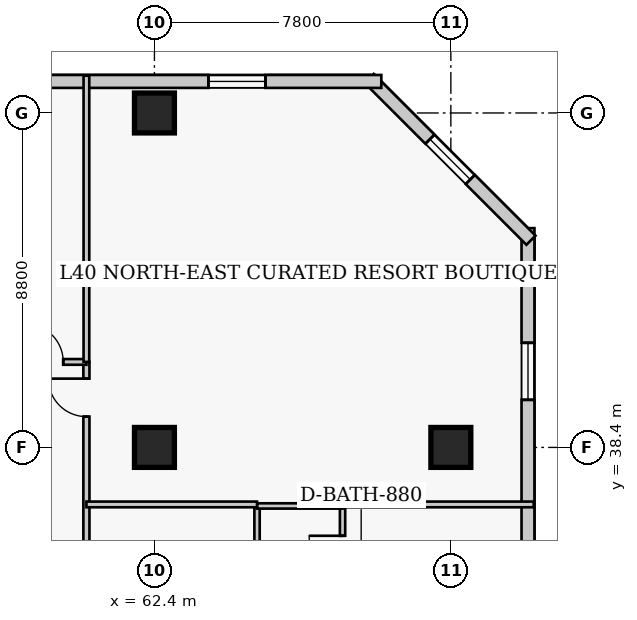
"""IFC4 building model, lengths in metres.
Left out: names, types, materials, properties, quantities, classifications, styles, units other than length and angle.
Written with IfcOpenShell. Run it as: python <this file> out.ifc"""

import sys

from ifc_helpers import new_model, si_unit, direction, frame, frame_2d, origin, origin_2d, place, context, subcontext, project, spatial, rectangle, extrude, element, fill, save


model = new_model("IFC4")
c1 = context("Model", 3, precision=1e-05, world=origin(), true_north=direction((0.0, 1.0)))
c2 = subcontext(c1, "Body", "Model", "MODEL_VIEW")
j1 = project(units=[si_unit("LENGTHUNIT", "METRE"), si_unit("PLANEANGLEUNIT", "RADIAN")], contexts=[c1])
p1 = place(None, origin())
s1 = spatial("IfcSite", under=j1, at=p1, CompositionType="ELEMENT")
p2 = place(p1, origin())
s2 = spatial("IfcBuilding", under=s1, at=p2, CompositionType="ELEMENT")
p3 = place(p2, frame((0.0, 0.0, 161.2)))
s3 = spatial("IfcBuildingStorey", under=s2, at=p3, CompositionType="ELEMENT", Elevation=161.2)
for number, where, z_axis, x_axis in (
    (1, (62.4, 38.4, 0.0), (0.0, 0.0, 1.0), (1.0, 0.0, 0.0)),
    (2, (62.4, 47.2, 0.0), (0.0, 0.0, 1.0), (1.0, 0.0, 0.0)),
    (3, (70.2, 38.4, 0.0), (0.0, 0.0, 1.0), (1.0, 0.0, 0.0)),
):
    element("IfcColumn", number, at=place(p3, frame(where, z_axis=z_axis, x_axis=x_axis)), inside=s3, PredefinedType="COLUMN", context=c2, shape_type="SweptSolid", body=[
        extrude(rectangle(XDim=1.05, YDim=1.05, at=origin_2d()), origin(), (0.0, 0.0, 1.0), 3.8),
    ])
p4 = place(p3, frame((72.23, 14.03, 0.0), z_axis=(0.0, 0.0, 1.0), x_axis=(0.0, 1.0, 0.0)))
e4 = element("IfcWall", 4, at=p4, inside=s3, PredefinedType="SOLIDWALL", context=c2, shape_type="SweptSolid", body=[
    extrude(rectangle(XDim=30.14, YDim=0.34, at=frame_2d((15.07, 0.0))), origin(), (0.0, 0.0, 1.0), 3.55),
])
p5 = place(p4, frame((3.018, 0.0, 0.85)))
e5 = element("IfcOpeningElement", 5, at=p5, cuts=e4, PredefinedType="OPENING", context=c2, shape_type="SweptSolid", body=[
    extrude(rectangle(XDim=1.5, YDim=1.75, at=frame_2d((0.75, 0.875))), frame((0.0, 0.18, 0.0), z_axis=(0.0, -1.0, 0.0), x_axis=(1.0, 0.0, 0.0)), (0.0, 0.0, 1.0), 0.36),
])
p6 = place(p4, frame((10.552, 0.0, 0.85)))
e6 = element("IfcOpeningElement", 6, at=p6, cuts=e4, PredefinedType="OPENING", context=c2, shape_type="SweptSolid", body=[
    extrude(rectangle(XDim=1.5, YDim=1.75, at=frame_2d((0.75, 0.875))), frame((0.0, 0.18, 0.0), z_axis=(0.0, -1.0, 0.0), x_axis=(1.0, 0.0, 0.0)), (0.0, 0.0, 1.0), 0.36),
])
p7 = place(p4, frame((18.087, 0.0, 0.85)))
e7 = element("IfcOpeningElement", 7, at=p7, cuts=e4, PredefinedType="OPENING", context=c2, shape_type="SweptSolid", body=[
    extrude(rectangle(XDim=1.5, YDim=1.75, at=frame_2d((0.75, 0.875))), frame((0.0, 0.18, 0.0), z_axis=(0.0, -1.0, 0.0), x_axis=(1.0, 0.0, 0.0)), (0.0, 0.0, 1.0), 0.36),
])
p8 = place(p4, frame((25.623, 0.0, 0.85)))
e8 = element("IfcOpeningElement", 8, at=p8, cuts=e4, PredefinedType="OPENING", context=c2, shape_type="SweptSolid", body=[
    extrude(rectangle(XDim=1.5, YDim=1.75, at=frame_2d((0.75, 0.875))), frame((0.0, 0.18, 0.0), z_axis=(0.0, -1.0, 0.0), x_axis=(1.0, 0.0, 0.0)), (0.0, 0.0, 1.0), 0.36),
])
p9 = place(p3, frame((72.308, 43.852, 0.0), z_axis=(0.0, 0.0, 1.0), x_axis=(-0.707106781187, 0.707106781187, 0.0)))
e9 = element("IfcWall", 9, at=p9, inside=s3, PredefinedType="SOLIDWALL", context=c2, shape_type="SweptSolid", body=[
    extrude(rectangle(XDim=6.02, YDim=0.34, at=frame_2d((3.01, 0.0))), origin(), (0.0, 0.0, 1.0), 3.55),
])
p10 = place(p9, frame((2.26, 0.0, 0.85)))
e10 = element("IfcOpeningElement", 10, at=p10, cuts=e9, PredefinedType="OPENING", context=c2, shape_type="SweptSolid", body=[
    extrude(rectangle(XDim=1.5, YDim=1.75, at=frame_2d((0.75, 0.875))), frame((0.0, 0.18, 0.0), z_axis=(0.0, -1.0, 0.0), x_axis=(1.0, 0.0, 0.0)), (0.0, 0.0, 1.0), 0.36),
])
p11 = place(p3, frame((68.37, 48.03, 0.0), z_axis=(0.0, 0.0, 1.0), x_axis=(-1.0, 0.0, 0.0)))
e11 = element("IfcWall", 11, at=p11, inside=s3, PredefinedType="SOLIDWALL", context=c2, shape_type="SweptSolid", body=[
    extrude(rectangle(XDim=26.69, YDim=0.34, at=frame_2d((13.345, 0.0))), origin(), (0.0, 0.0, 1.0), 3.55),
])
p12 = place(p11, frame((3.048, 0.0, 0.85)))
e12 = element("IfcOpeningElement", 12, at=p12, cuts=e11, PredefinedType="OPENING", context=c2, shape_type="SweptSolid", body=[
    extrude(rectangle(XDim=1.5, YDim=1.75, at=frame_2d((0.75, 0.875))), frame((0.0, 0.18, 0.0), z_axis=(0.0, -1.0, 0.0), x_axis=(1.0, 0.0, 0.0)), (0.0, 0.0, 1.0), 0.36),
])
p13 = place(p11, frame((11.445, 0.0, 0.85)))
e13 = element("IfcOpeningElement", 13, at=p13, cuts=e11, PredefinedType="OPENING", context=c2, shape_type="SweptSolid", body=[
    extrude(rectangle(XDim=1.5, YDim=1.75, at=frame_2d((0.75, 0.875))), frame((0.0, 0.18, 0.0), z_axis=(0.0, -1.0, 0.0), x_axis=(1.0, 0.0, 0.0)), (0.0, 0.0, 1.0), 0.36),
])
p14 = place(p11, frame((22.642, 0.0, 0.85)))
e14 = element("IfcOpeningElement", 14, at=p14, cuts=e11, PredefinedType="OPENING", context=c2, shape_type="SweptSolid", body=[
    extrude(rectangle(XDim=1.5, YDim=1.75, at=frame_2d((0.75, 0.875))), frame((0.0, 0.18, 0.0), z_axis=(0.0, -1.0, 0.0), x_axis=(1.0, 0.0, 0.0)), (0.0, 0.0, 1.0), 0.36),
])
p15 = place(p3, frame((60.61, 12.05, 0.0), z_axis=(0.0, 0.0, 1.0), x_axis=(0.0, 1.0, 0.0)))
e15 = element("IfcWall", 15, at=p15, inside=s3, PredefinedType="PARTITIONING", context=c2, shape_type="SweptSolid", body=[
    extrude(rectangle(XDim=28.6, YDim=0.16, at=frame_2d((14.3, 0.0))), origin(), (0.0, 0.0, 1.0), 3.55),
])
p16 = place(p15, frame((3.5, 0.0, 0.0)))
e16 = element("IfcOpeningElement", 16, at=p16, cuts=e15, PredefinedType="OPENING", context=c2, shape_type="SweptSolid", body=[
    extrude(rectangle(XDim=0.95, YDim=2.1, at=frame_2d((0.475, 1.05))), frame((0.0, 0.09, 0.0), z_axis=(0.0, -1.0, 0.0), x_axis=(1.0, 0.0, 0.0)), (0.0, 0.0, 1.0), 0.18),
])
p17 = place(p15, frame((11.875, 0.0, 0.0)))
e17 = element("IfcOpeningElement", 17, at=p17, cuts=e15, PredefinedType="OPENING", context=c2, shape_type="SweptSolid", body=[
    extrude(rectangle(XDim=0.95, YDim=2.1, at=frame_2d((0.475, 1.05))), frame((0.0, 0.09, 0.0), z_axis=(0.0, -1.0, 0.0), x_axis=(1.0, 0.0, 0.0)), (0.0, 0.0, 1.0), 0.18),
])
p18 = place(p15, frame((20.325, 0.0, 0.0)))
e18 = element("IfcOpeningElement", 18, at=p18, cuts=e15, PredefinedType="OPENING", context=c2, shape_type="SweptSolid", body=[
    extrude(rectangle(XDim=0.95, YDim=2.1, at=frame_2d((0.475, 1.05))), frame((0.0, 0.09, 0.0), z_axis=(0.0, -1.0, 0.0), x_axis=(1.0, 0.0, 0.0)), (0.0, 0.0, 1.0), 0.18),
])
p19 = place(p15, frame((27.16, 0.0, 0.0)))
e19 = element("IfcOpeningElement", 19, at=p19, cuts=e15, PredefinedType="OPENING", context=c2, shape_type="SweptSolid", body=[
    extrude(rectangle(XDim=1.0, YDim=2.15, at=frame_2d((0.5, 1.075))), frame((0.0, 0.09, 0.0), z_axis=(0.0, -1.0, 0.0), x_axis=(1.0, 0.0, 0.0)), (0.0, 0.0, 1.0), 0.18),
])
p20 = place(p3, frame((56.8, 40.65, 0.0), z_axis=(0.0, 0.0, 1.0), x_axis=(1.0, 0.0, 0.0)))
e20 = element("IfcWall", 20, at=p20, inside=s3, PredefinedType="PARTITIONING", context=c2, shape_type="SweptSolid", body=[
    extrude(rectangle(XDim=3.81, YDim=0.15, at=frame_2d((1.905, 0.0))), origin(), (0.0, 0.0, 1.0), 3.55),
])
p21 = place(p20, frame((2.2, 0.0, 0.0)))
e21 = element("IfcOpeningElement", 21, at=p21, cuts=e20, PredefinedType="OPENING", context=c2, shape_type="SweptSolid", body=[
    extrude(rectangle(XDim=1.0, YDim=2.15, at=frame_2d((0.5, 1.075))), frame((0.0, 0.085, 0.0), z_axis=(0.0, -1.0, 0.0), x_axis=(1.0, 0.0, 0.0)), (0.0, 0.0, 1.0), 0.17),
])
p22 = place(p3, frame((60.61, 40.65, 0.0), z_axis=(0.0, 0.0, 1.0), x_axis=(0.0, 1.0, 0.0)))
e22 = element("IfcWall", 22, at=p22, inside=s3, PredefinedType="PARTITIONING", context=c2, shape_type="SweptSolid", body=[
    extrude(rectangle(XDim=7.53, YDim=0.15, at=frame_2d((3.765, 0.0))), origin(), (0.0, 0.0, 1.0), 3.55),
])
p23 = place(p3, frame((65.1, 34.41, 0.0), z_axis=(0.0, 0.0, 1.0), x_axis=(0.0, 1.0, 0.0)))
e23 = element("IfcWall", 23, at=p23, inside=s3, PredefinedType="PLUMBINGWALL", context=c2, shape_type="SweptSolid", body=[
    extrude(rectangle(XDim=2.45, YDim=0.14, at=frame_2d((1.225, 0.0))), origin(), (0.0, 0.0, 1.0), 3.55),
])
p24 = place(p3, frame((67.35, 34.41, 0.0), z_axis=(0.0, 0.0, 1.0), x_axis=(0.0, 1.0, 0.0)))
e24 = element("IfcWall", 24, at=p24, inside=s3, PredefinedType="PLUMBINGWALL", context=c2, shape_type="SweptSolid", body=[
    extrude(rectangle(XDim=2.45, YDim=0.14, at=frame_2d((1.225, 0.0))), origin(), (0.0, 0.0, 1.0), 3.55),
])
p25 = place(p24, frame((0.785, 0.0, 0.0)))
e25 = element("IfcOpeningElement", 25, at=p25, cuts=e24, PredefinedType="OPENING", context=c2, shape_type="SweptSolid", body=[
    extrude(rectangle(XDim=0.88, YDim=2.05, at=frame_2d((0.44, 1.025))), frame((0.0, 0.08, 0.0), z_axis=(0.0, -1.0, 0.0), x_axis=(1.0, 0.0, 0.0)), (0.0, 0.0, 1.0), 0.16),
])
p26 = place(p3, frame((65.1, 36.86, 0.0), z_axis=(0.0, 0.0, 1.0), x_axis=(1.0, 0.0, 0.0)))
e26 = element("IfcWall", 26, at=p26, inside=s3, PredefinedType="PLUMBINGWALL", context=c2, shape_type="SweptSolid", body=[
    extrude(rectangle(XDim=2.25, YDim=0.14, at=frame_2d((1.125, 0.0))), origin(), (0.0, 0.0, 1.0), 3.55),
])
p27 = place(p3, frame((60.61, 36.9, 0.0), z_axis=(0.0, 0.0, 1.0), x_axis=(1.0, 0.0, 0.0)))
e27 = element("IfcWall", 27, at=p27, inside=s3, PredefinedType="PARTITIONING", context=c2, shape_type="SweptSolid", body=[
    extrude(rectangle(XDim=4.49, YDim=0.15, at=frame_2d((2.245, 0.0))), origin(), (0.0, 0.0, 1.0), 3.55),
])
p28 = place(p3, frame((67.35, 36.9, 0.0), z_axis=(0.0, 0.0, 1.0), x_axis=(1.0, 0.0, 0.0)))
e28 = element("IfcWall", 28, at=p28, inside=s3, PredefinedType="PARTITIONING", context=c2, shape_type="SweptSolid", body=[
    extrude(rectangle(XDim=5.03, YDim=0.15, at=frame_2d((2.515, 0.0))), origin(), (0.0, 0.0, 1.0), 3.55),
])
p29 = place(p8, origin())
e29 = element("IfcWindow", 29, at=p29, inside=s3, PartitioningType="SINGLE_PANEL", PredefinedType="WINDOW", context=c2, shape_type="SweptSolid", body=[
    extrude(rectangle(XDim=1.5, YDim=1.75, at=frame_2d((0.75, 0.875))), frame((0.0, 0.03, 0.0), z_axis=(0.0, -1.0, 0.0), x_axis=(1.0, 0.0, 0.0)), (0.0, 0.0, 1.0), 0.06),
])
fill(e8, e29)
p30 = place(p10, origin())
e30 = element("IfcWindow", 30, at=p30, inside=s3, PartitioningType="SINGLE_PANEL", PredefinedType="WINDOW", context=c2, shape_type="SweptSolid", body=[
    extrude(rectangle(XDim=1.5, YDim=1.75, at=frame_2d((0.75, 0.875))), frame((0.0, 0.03, 0.0), z_axis=(0.0, -1.0, 0.0), x_axis=(1.0, 0.0, 0.0)), (0.0, 0.0, 1.0), 0.06),
])
fill(e10, e30)
p31 = place(p12, origin())
e31 = element("IfcWindow", 31, at=p31, inside=s3, PartitioningType="SINGLE_PANEL", PredefinedType="WINDOW", context=c2, shape_type="SweptSolid", body=[
    extrude(rectangle(XDim=1.5, YDim=1.75, at=frame_2d((0.75, 0.875))), frame((0.0, 0.03, 0.0), z_axis=(0.0, -1.0, 0.0), x_axis=(1.0, 0.0, 0.0)), (0.0, 0.0, 1.0), 0.06),
])
fill(e12, e31)
p32 = place(p21, origin())
e32 = element("IfcDoor", 32, at=p32, inside=s3, OperationType="SINGLE_SWING_LEFT", PredefinedType="DOOR", context=c2, shape_type="SweptSolid", body=[
    extrude(rectangle(XDim=1.0, YDim=2.15, at=frame_2d((0.5, 1.075))), frame((0.0, 0.025, 0.0), z_axis=(0.0, -1.0, 0.0), x_axis=(1.0, 0.0, 0.0)), (0.0, 0.0, 1.0), 0.05),
])
fill(e21, e32)
p33 = place(p25, origin())
e33 = element("IfcDoor", 33, at=p33, inside=s3, OperationType="SINGLE_SWING_RIGHT", PredefinedType="DOOR", context=c2, shape_type="SweptSolid", body=[
    extrude(rectangle(XDim=0.88, YDim=2.05, at=frame_2d((0.44, 1.025))), frame((0.0, 0.025, 0.0), z_axis=(0.0, -1.0, 0.0), x_axis=(1.0, 0.0, 0.0)), (0.0, 0.0, 1.0), 0.05),
])
fill(e25, e33)
p34 = place(p19, origin())
e34 = element("IfcDoor", 34, at=p34, inside=s3, OperationType="SINGLE_SWING_RIGHT", PredefinedType="DOOR", context=c2, shape_type="SweptSolid", body=[
    extrude(rectangle(XDim=1.0, YDim=2.15, at=frame_2d((0.5, 1.075))), frame((0.0, 0.025, 0.0), z_axis=(0.0, -1.0, 0.0), x_axis=(1.0, 0.0, 0.0)), (0.0, 0.0, 1.0), 0.05),
])
fill(e19, e34)
save(model, sys.argv[1])
